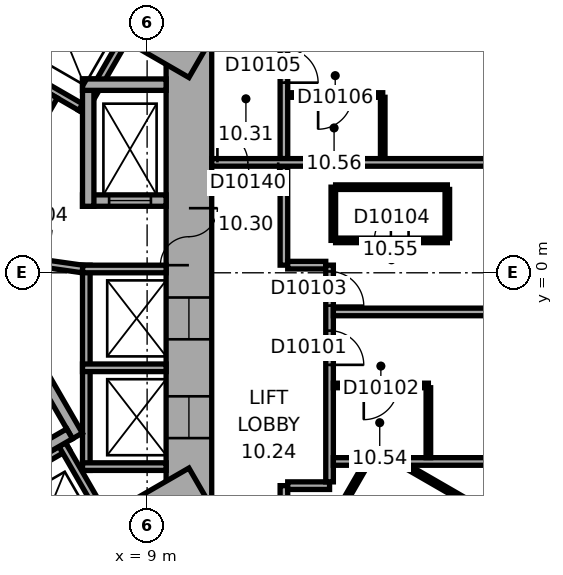
"""IFC4 building model, lengths in metres.
Left out: names, types, materials, properties, quantities, classifications, styles, units other than length and angle.
Written with IfcOpenShell. Run it as: python <this file> out.ifc"""

import sys

from ifc_helpers import new_model, si_unit, direction, frame, frame_2d, origin, place, context, subcontext, project, spatial, rectangle, extrude, element, fill, save


model = new_model("IFC4")
c1 = context("Model", 3, precision=1e-05, world=origin(), true_north=direction((0.0, 1.0)))
c2 = subcontext(c1, "Body", "Model", "MODEL_VIEW")
j1 = project(units=[si_unit("LENGTHUNIT", "METRE"), si_unit("PLANEANGLEUNIT", "RADIAN")], contexts=[c1])
p1 = place(None, origin())
s1 = spatial("IfcSite", under=j1, at=p1, CompositionType="ELEMENT")
p2 = place(p1, origin())
s2 = spatial("IfcBuilding", under=s1, at=p2, CompositionType="ELEMENT")
p3 = place(p2, frame((0.0, 0.0, 53.9)))
s3 = spatial("IfcBuildingStorey", under=s2, at=p3, CompositionType="ELEMENT", Elevation=53.9)
p4 = place(p3, frame((10.1, -6.177, 0.0), z_axis=(0.0, 0.0, 1.0), x_axis=(0.0, 1.0, 0.0)))
e1 = element("IfcWall", 1, at=p4, inside=s3, PredefinedType="SHEAR", context=c2, shape_type="SweptSolid", body=[
    extrude(rectangle(XDim=12.355, YDim=1.2, at=frame_2d((6.177, 0.0))), origin(), (0.0, 0.0, 1.0), 3.3),
])
p5 = place(p4, frame((6.378, 0.0, 0.0)))
e2 = element("IfcOpeningElement", 2, at=p5, cuts=e1, PredefinedType="OPENING", context=c2, shape_type="SweptSolid", body=[
    extrude(rectangle(XDim=1.5, YDim=2.1, at=frame_2d((0.75, 1.05))), frame((0.0, 0.61, 0.0), z_axis=(0.0, -1.0, 0.0), x_axis=(1.0, 0.0, 0.0)), (0.0, 0.0, 1.0), 1.22),
])
p6 = place(p4, frame((1.828, 0.0, 0.0)))
e3 = element("IfcOpeningElement", 3, at=p6, cuts=e1, PredefinedType="OPENING", context=c2, shape_type="SweptSolid", body=[
    extrude(rectangle(XDim=1.1, YDim=2.1, at=frame_2d((0.55, 1.05))), frame((0.0, 0.61, 0.0), z_axis=(0.0, -1.0, 0.0), x_axis=(1.0, 0.0, 0.0)), (0.0, 0.0, 1.0), 1.22),
])
p7 = place(p4, frame((4.427, 0.0, 0.0)))
e4 = element("IfcOpeningElement", 4, at=p7, cuts=e1, PredefinedType="OPENING", context=c2, shape_type="SweptSolid", body=[
    extrude(rectangle(XDim=1.1, YDim=2.1, at=frame_2d((0.55, 1.05))), frame((0.0, 0.61, 0.0), z_axis=(0.0, -1.0, 0.0), x_axis=(1.0, 0.0, 0.0)), (0.0, 0.0, 1.0), 1.22),
])
p8 = place(p3, frame((10.4, 5.658, 0.0), z_axis=(0.0, 0.0, 1.0), x_axis=(-0.866021384402, 0.500006961711, 0.0)))
e5 = element("IfcWall", 5, at=p8, inside=s3, PredefinedType="SHEAR", context=c2, shape_type="SweptSolid", body=[
    extrude(rectangle(XDim=12.355, YDim=1.2, at=frame_2d((6.178, 0.0))), origin(), (0.0, 0.0, 1.0), 3.3),
])
p9 = place(p8, frame((2.728, 0.0, 0.0)))
e6 = element("IfcOpeningElement", 6, at=p9, cuts=e5, PredefinedType="OPENING", context=c2, shape_type="SweptSolid", body=[
    extrude(rectangle(XDim=1.1, YDim=2.1, at=frame_2d((0.55, 1.05))), frame((0.0, 0.61, 0.0), z_axis=(0.0, -1.0, 0.0), x_axis=(1.0, 0.0, 0.0)), (0.0, 0.0, 1.0), 1.22),
])
p10 = place(p8, frame((5.328, 0.0, 0.0)))
e7 = element("IfcOpeningElement", 7, at=p10, cuts=e5, PredefinedType="OPENING", context=c2, shape_type="SweptSolid", body=[
    extrude(rectangle(XDim=1.1, YDim=2.1, at=frame_2d((0.55, 1.05))), frame((0.0, 0.61, 0.0), z_axis=(0.0, -1.0, 0.0), x_axis=(1.0, 0.0, 0.0)), (0.0, 0.0, 1.0), 1.22),
])
p11 = place(p8, frame((7.928, 0.0, 0.0)))
e8 = element("IfcOpeningElement", 8, at=p11, cuts=e5, PredefinedType="OPENING", context=c2, shape_type="SweptSolid", body=[
    extrude(rectangle(XDim=1.1, YDim=2.1, at=frame_2d((0.55, 1.05))), frame((0.0, 0.61, 0.0), z_axis=(0.0, -1.0, 0.0), x_axis=(1.0, 0.0, 0.0)), (0.0, 0.0, 1.0), 1.22),
])
p12 = place(p3, frame((-0.3, -11.836, 0.0), z_axis=(0.0, 0.0, 1.0), x_axis=(0.866021384402, 0.500006961711, 0.0)))
e9 = element("IfcWall", 9, at=p12, inside=s3, PredefinedType="SHEAR", context=c2, shape_type="SweptSolid", body=[
    extrude(rectangle(XDim=12.355, YDim=1.2, at=frame_2d((6.178, 0.0))), origin(), (0.0, 0.0, 1.0), 3.3),
])
p13 = place(p12, frame((4.128, 0.0, 0.0)))
e10 = element("IfcOpeningElement", 10, at=p13, cuts=e9, PredefinedType="OPENING", context=c2, shape_type="SweptSolid", body=[
    extrude(rectangle(XDim=0.9, YDim=2.1, at=frame_2d((0.45, 1.05))), frame((0.0, 0.61, 0.0), z_axis=(0.0, -1.0, 0.0), x_axis=(1.0, 0.0, 0.0)), (0.0, 0.0, 1.0), 1.22),
])
p14 = place(p12, frame((7.928, 0.0, 0.0)))
e11 = element("IfcOpeningElement", 11, at=p14, cuts=e9, PredefinedType="OPENING", context=c2, shape_type="SweptSolid", body=[
    extrude(rectangle(XDim=1.1, YDim=2.1, at=frame_2d((0.55, 1.05))), frame((0.0, 0.61, 0.0), z_axis=(0.0, -1.0, 0.0), x_axis=(1.0, 0.0, 0.0)), (0.0, 0.0, 1.0), 1.22),
])
p15 = place(p3, frame((7.4, -5.2, 0.0), z_axis=(0.0, 0.0, 1.0), x_axis=(0.0, 1.0, 0.0)))
e12 = element("IfcWall", 12, at=p15, inside=s3, PredefinedType="PARTITIONING", context=c2, shape_type="SweptSolid", body=[
    extrude(rectangle(XDim=5.4, YDim=0.2, at=frame_2d((2.7, 0.0))), origin(), (0.0, 0.0, 1.0), 3.05),
])
for number, where, z_axis, x_axis in (
    (13, (7.3, -5.1, 0.0), (0.0, 0.0, 1.0), (1.0, 0.0, 0.0)),
    (14, (7.3, -2.5, 0.0), (0.0, 0.0, 1.0), (1.0, 0.0, 0.0)),
    (15, (7.3, 0.1, 0.0), (0.0, 0.0, 1.0), (1.0, 0.0, 0.0)),
):
    element("IfcWall", number, at=place(p3, frame(where, z_axis=z_axis, x_axis=x_axis)), inside=s3, PredefinedType="PARTITIONING", context=c2, shape_type="SweptSolid", body=[
        extrude(rectangle(XDim=2.2, YDim=0.2, at=frame_2d((1.1, 0.0))), origin(), (0.0, 0.0, 1.0), 3.05),
    ])
p16 = place(p3, frame((7.424, 4.259, 0.0), z_axis=(0.0, 0.0, 1.0), x_axis=(-0.866026010844, 0.49999894854, 0.0)))
e16 = element("IfcWall", 16, at=p16, inside=s3, PredefinedType="PARTITIONING", context=c2, shape_type="SweptSolid", body=[
    extrude(rectangle(XDim=8.0, YDim=0.2, at=frame_2d((4.0, 0.0))), origin(), (0.0, 0.0, 1.0), 3.05),
])
p17 = place(p3, frame((7.287, 4.222, 0.0), z_axis=(0.0, 0.0, 1.0), x_axis=(0.499946605688, 0.86605622881, 0.0)))
e17 = element("IfcWall", 17, at=p17, inside=s3, PredefinedType="PARTITIONING", context=c2, shape_type="SweptSolid", body=[
    extrude(rectangle(XDim=2.2, YDim=0.2, at=frame_2d((1.1, 0.0))), origin(), (0.0, 0.0, 1.0), 3.05),
])
p18 = place(p3, frame((-0.024, -8.559, 0.0), z_axis=(0.0, 0.0, 1.0), x_axis=(0.866026010844, 0.49999894854, 0.0)))
e18 = element("IfcWall", 18, at=p18, inside=s3, PredefinedType="PARTITIONING", context=c2, shape_type="SweptSolid", body=[
    extrude(rectangle(XDim=8.0, YDim=0.2, at=frame_2d((4.0, 0.0))), origin(), (0.0, 0.0, 1.0), 3.05),
])
p19 = place(p3, frame((6.768, -4.522, 0.0), z_axis=(0.0, 0.0, 1.0), x_axis=(0.50002983664, -0.866008176907, 0.0)))
e19 = element("IfcWall", 19, at=p19, inside=s3, PredefinedType="PARTITIONING", context=c2, shape_type="SweptSolid", body=[
    extrude(rectangle(XDim=2.2, YDim=0.2, at=frame_2d((1.1, 0.0))), origin(), (0.0, 0.0, 1.0), 3.05),
])
p20 = place(p3, frame((4.158, 0.602, 0.0), z_axis=(0.0, 0.0, 1.0), x_axis=(0.499977259774, 0.866038532462, 0.0)))
e20 = element("IfcWall", 20, at=p20, inside=s3, PredefinedType="SHEAR", context=c2, shape_type="SweptSolid", body=[
    extrude(rectangle(XDim=4.7, YDim=0.3, at=frame_2d((2.35, 0.0))), origin(), (0.0, 0.0, 1.0), 3.05),
])
p21 = place(p20, frame((0.8, 0.0, 0.0)))
e21 = element("IfcOpeningElement", 21, at=p21, cuts=e20, PredefinedType="OPENING", context=c2, shape_type="SweptSolid", body=[
    extrude(rectangle(XDim=1.2, YDim=2.1, at=frame_2d((0.6, 1.05))), frame((0.0, 0.16, 0.0), z_axis=(0.0, -1.0, 0.0), x_axis=(1.0, 0.0, 0.0)), (0.0, 0.0, 1.0), 0.32),
])
p22 = place(p3, frame((4.816, -0.222, 0.0), z_axis=(0.0, 0.0, 1.0), x_axis=(0.499977259774, -0.866038532462, 0.0)))
e22 = element("IfcWall", 22, at=p22, inside=s3, PredefinedType="SHEAR", context=c2, shape_type="SweptSolid", body=[
    extrude(rectangle(XDim=4.7, YDim=0.3, at=frame_2d((2.35, 0.0))), origin(), (0.0, 0.0, 1.0), 3.05),
])
p23 = place(p3, frame((0.847, -7.767, 0.0), z_axis=(0.0, 0.0, 1.0), x_axis=(0.866027801685, 0.499995846692, 0.0)))
e23 = element("IfcWall", 23, at=p23, inside=s3, PredefinedType="SHEAR", context=c2, shape_type="SweptSolid", body=[
    extrude(rectangle(XDim=7.06, YDim=0.3, at=frame_2d((3.53, 0.0))), origin(), (0.0, 0.0, 1.0), 3.05),
])
p24 = place(p3, frame((7.3, 1.9, 0.0), z_axis=(0.0, 0.0, 1.0), x_axis=(1.0, 0.0, 0.0)))
e24 = element("IfcWall", 24, at=p24, inside=s3, PredefinedType="SHEAR", context=c2, shape_type="SweptSolid", body=[
    extrude(rectangle(XDim=2.2, YDim=0.3, at=frame_2d((1.1, 0.0))), origin(), (0.0, 0.0, 1.0), 3.05),
])
p25 = place(p24, frame((0.7, 0.0, 0.0)))
e25 = element("IfcOpeningElement", 25, at=p25, cuts=e24, PredefinedType="OPENING", context=c2, shape_type="SweptSolid", body=[
    extrude(rectangle(XDim=1.1, YDim=2.1, at=frame_2d((0.55, 1.05))), frame((0.0, 0.16, 0.0), z_axis=(0.0, -1.0, 0.0), x_axis=(1.0, 0.0, 0.0)), (0.0, 0.0, 1.0), 0.32),
])
p26 = place(p3, frame((7.45, 1.75, 0.0), z_axis=(0.0, 0.0, 1.0), x_axis=(0.0, 1.0, 0.0)))
e26 = element("IfcWall", 26, at=p26, inside=s3, PredefinedType="SHEAR", context=c2, shape_type="SweptSolid", body=[
    extrude(rectangle(XDim=3.35, YDim=0.3, at=frame_2d((1.675, 0.0))), origin(), (0.0, 0.0, 1.0), 3.05),
])
p27 = place(p3, frame((7.3, 4.95, 0.0), z_axis=(0.0, 0.0, 1.0), x_axis=(1.0, 0.0, 0.0)))
e27 = element("IfcWall", 27, at=p27, inside=s3, PredefinedType="SHEAR", context=c2, shape_type="SweptSolid", body=[
    extrude(rectangle(XDim=2.2, YDim=0.3, at=frame_2d((1.1, 0.0))), origin(), (0.0, 0.0, 1.0), 3.05),
])
p28 = place(p3, frame((4.327, 0.521, 0.0), z_axis=(0.0, 0.0, 1.0), x_axis=(0.990124376366, -0.14019172346, 0.0)))
e28 = element("IfcWall", 28, at=p28, inside=s3, PredefinedType="PARTITIONING", context=c2, shape_type="SweptSolid", body=[
    extrude(rectangle(XDim=3.002, YDim=0.2, at=frame_2d((1.501, 0.0))), origin(), (0.0, 0.0, 1.0), 3.05),
])
p29 = place(p28, frame((1.15, 0.0, 0.0)))
e29 = element("IfcOpeningElement", 29, at=p29, cuts=e28, PredefinedType="OPENING", context=c2, shape_type="SweptSolid", body=[
    extrude(rectangle(XDim=0.9, YDim=2.1, at=frame_2d((0.45, 1.05))), frame((0.0, 0.11, 0.0), z_axis=(0.0, -1.0, 0.0), x_axis=(1.0, 0.0, 0.0)), (0.0, 0.0, 1.0), 0.22),
])
p30 = place(p3, frame((12.6, -6.138, 0.0), z_axis=(0.0, 0.0, 1.0), x_axis=(0.0, 1.0, 0.0)))
e30 = element("IfcWall", 30, at=p30, inside=s3, PredefinedType="PARTITIONING", context=c2, shape_type="SweptSolid", body=[
    extrude(rectangle(XDim=0.537, YDim=0.2, at=frame_2d((0.268, 0.0))), origin(), (0.0, 0.0, 1.0), 3.05),
])
p31 = place(p3, frame((12.6, 0.201, 0.0), z_axis=(0.0, 0.0, 1.0), x_axis=(0.0, 1.0, 0.0)))
e31 = element("IfcWall", 31, at=p31, inside=s3, PredefinedType="PARTITIONING", context=c2, shape_type="SweptSolid", body=[
    extrude(rectangle(XDim=2.604, YDim=0.2, at=frame_2d((1.302, 0.0))), origin(), (0.0, 0.0, 1.0), 3.05),
])
p32 = place(p3, frame((12.6, 3.004, 0.0), z_axis=(0.0, 0.0, 1.0), x_axis=(0.0, 1.0, 0.0)))
e32 = element("IfcWall", 32, at=p32, inside=s3, PredefinedType="PARTITIONING", context=c2, shape_type="SweptSolid", body=[
    extrude(rectangle(XDim=3.173, YDim=0.2, at=frame_2d((1.586, 0.0))), origin(), (0.0, 0.0, 1.0), 3.05),
])
p33 = place(p32, frame((1.998, 0.0, 0.0)))
e33 = element("IfcOpeningElement", 33, at=p33, cuts=e32, PredefinedType="OPENING", context=c2, shape_type="SweptSolid", body=[
    extrude(rectangle(XDim=0.9, YDim=2.1, at=frame_2d((0.45, 1.05))), frame((0.0, 0.11, 0.0), z_axis=(0.0, -1.0, 0.0), x_axis=(1.0, 0.0, 0.0)), (0.0, 0.0, 1.0), 0.22),
])
p34 = place(p3, frame((12.7, -5.601, 0.0), z_axis=(0.0, 0.0, 1.0), x_axis=(1.0, 0.0, 0.0)))
e34 = element("IfcWall", 34, at=p34, inside=s3, PredefinedType="PARTITIONING", context=c2, shape_type="SweptSolid", body=[
    extrude(rectangle(XDim=1.101, YDim=0.2, at=frame_2d((0.551, 0.0))), origin(), (0.0, 0.0, 1.0), 3.05),
])
p35 = place(p3, frame((12.7, 4.677, 0.0), z_axis=(0.0, 0.0, 1.0), x_axis=(1.0, 0.0, 0.0)))
e35 = element("IfcWall", 35, at=p35, inside=s3, PredefinedType="PARTITIONING", context=c2, shape_type="SweptSolid", body=[
    extrude(rectangle(XDim=2.5, YDim=0.12, at=frame_2d((1.25, 0.0))), origin(), (0.0, 0.0, 1.0), 3.05),
])
p36 = place(p35, frame((0.8, 0.0, 0.0)))
e36 = element("IfcOpeningElement", 36, at=p36, cuts=e35, PredefinedType="OPENING", context=c2, shape_type="SweptSolid", body=[
    extrude(rectangle(XDim=0.9, YDim=2.1, at=frame_2d((0.45, 1.05))), frame((0.0, 0.07, 0.0), z_axis=(0.0, -1.0, 0.0), x_axis=(1.0, 0.0, 0.0)), (0.0, 0.0, 1.0), 0.14),
])
p37 = place(p3, frame((13.701, 0.201, 0.0), z_axis=(0.0, 0.0, 1.0), x_axis=(-1.0, 0.0, 0.0)))
e37 = element("IfcWall", 37, at=p37, inside=s3, PredefinedType="PARTITIONING", context=c2, shape_type="SweptSolid", body=[
    extrude(rectangle(XDim=1.001, YDim=0.2, at=frame_2d((0.5, 0.0))), origin(), (0.0, 0.0, 1.0), 3.05),
])
p38 = place(p3, frame((13.801, -5.501, 0.0), z_axis=(0.0, 0.0, 1.0), x_axis=(0.0, 1.0, 0.0)))
e38 = element("IfcWall", 38, at=p38, inside=s3, PredefinedType="PARTITIONING", context=c2, shape_type="SweptSolid", body=[
    extrude(rectangle(XDim=5.702, YDim=0.2, at=frame_2d((2.851, 0.0))), origin(), (0.0, 0.0, 1.0), 3.05),
])
p39 = place(p38, frame((3.079, 0.0, 0.0)))
e39 = element("IfcOpeningElement", 39, at=p39, cuts=e38, PredefinedType="OPENING", context=c2, shape_type="SweptSolid", body=[
    extrude(rectangle(XDim=0.9, YDim=2.1, at=frame_2d((0.45, 1.05))), frame((0.0, 0.11, 0.0), z_axis=(0.0, -1.0, 0.0), x_axis=(1.0, 0.0, 0.0)), (0.0, 0.0, 1.0), 0.22),
])
p40 = place(p38, frame((4.636, 0.0, 0.0)))
e40 = element("IfcOpeningElement", 40, at=p40, cuts=e38, PredefinedType="OPENING", context=c2, shape_type="SweptSolid", body=[
    extrude(rectangle(XDim=0.9, YDim=2.1, at=frame_2d((0.45, 1.05))), frame((0.0, 0.11, 0.0), z_axis=(0.0, -1.0, 0.0), x_axis=(1.0, 0.0, 0.0)), (0.0, 0.0, 1.0), 0.22),
])
p41 = place(p3, frame((13.901, -6.524, 0.0), z_axis=(0.0, 0.0, 1.0), x_axis=(0.499964162598, 0.86604609353, 0.0)))
e41 = element("IfcWall", 41, at=p41, inside=s3, PredefinedType="PARTITIONING", context=c2, shape_type="SweptSolid", body=[
    extrude(rectangle(XDim=1.661, YDim=0.12, at=frame_2d((0.831, 0.0))), origin(), (0.0, 0.0, 1.0), 3.05),
])
p42 = place(p3, frame((13.901, -4.965, 0.0), z_axis=(0.0, 0.0, 1.0), x_axis=(1.0, 0.0, 0.0)))
e42 = element("IfcWall", 42, at=p42, inside=s3, PredefinedType="PARTITIONING", context=c2, shape_type="SweptSolid", body=[
    extrude(rectangle(XDim=8.049, YDim=0.2, at=frame_2d((4.024, 0.0))), origin(), (0.0, 0.0, 1.0), 3.05),
])
p43 = place(p3, frame((13.901, -2.965, 0.0), z_axis=(0.0, 0.0, 1.0), x_axis=(1.0, 0.0, 0.0)))
e43 = element("IfcWall", 43, at=p43, inside=s3, PredefinedType="PARTITIONING", context=c2, shape_type="SweptSolid", body=[
    extrude(rectangle(XDim=2.5, YDim=0.12, at=frame_2d((1.25, 0.0))), origin(), (0.0, 0.0, 1.0), 3.05),
])
p44 = place(p43, frame((0.8, 0.0, 0.0)))
e44 = element("IfcOpeningElement", 44, at=p44, cuts=e43, PredefinedType="OPENING", context=c2, shape_type="SweptSolid", body=[
    extrude(rectangle(XDim=0.9, YDim=2.1, at=frame_2d((0.45, 1.05))), frame((0.0, 0.07, 0.0), z_axis=(0.0, -1.0, 0.0), x_axis=(1.0, 0.0, 0.0)), (0.0, 0.0, 1.0), 0.14),
])
p45 = place(p3, frame((13.9, 0.853, 0.0), z_axis=(0.0, 0.0, 1.0), x_axis=(0.0, 1.0, 0.0)))
e45 = element("IfcWall", 45, at=p45, inside=s3, PredefinedType="PARTITIONING", context=c2, shape_type="SweptSolid", body=[
    extrude(rectangle(XDim=1.4, YDim=0.12, at=frame_2d((0.7, 0.0))), origin(), (0.0, 0.0, 1.0), 3.05),
])
p46 = place(p3, frame((13.96, 2.253, 0.0), z_axis=(0.0, 0.0, 1.0), x_axis=(1.0, 0.0, 0.0)))
e46 = element("IfcWall", 46, at=p46, inside=s3, PredefinedType="PARTITIONING", context=c2, shape_type="SweptSolid", body=[
    extrude(rectangle(XDim=2.94, YDim=0.12, at=frame_2d((1.47, 0.0))), origin(), (0.0, 0.0, 1.0), 3.05),
])
p47 = place(p3, frame((15.2, 4.618, 0.0), z_axis=(0.0, 0.0, 1.0), x_axis=(0.0, -1.0, 0.0)))
e47 = element("IfcWall", 47, at=p47, inside=s3, PredefinedType="PARTITIONING", context=c2, shape_type="SweptSolid", body=[
    extrude(rectangle(XDim=1.613, YDim=0.12, at=frame_2d((0.807, 0.0))), origin(), (0.0, 0.0, 1.0), 3.05),
])
p48 = place(p3, frame((15.841, -5.104, 0.0), z_axis=(0.0, 0.0, 1.0), x_axis=(0.866025591402, -0.499999675036, 0.0)))
e48 = element("IfcWall", 48, at=p48, inside=s3, PredefinedType="PARTITIONING", context=c2, shape_type="SweptSolid", body=[
    extrude(rectangle(XDim=1.83, YDim=0.12, at=frame_2d((0.915, 0.0))), origin(), (0.0, 0.0, 1.0), 3.05),
])
p49 = place(p3, frame((16.401, -3.025, 0.0), z_axis=(0.0, 0.0, 1.0), x_axis=(0.0, -1.0, 0.0)))
e49 = element("IfcWall", 49, at=p49, inside=s3, PredefinedType="PARTITIONING", context=c2, shape_type="SweptSolid", body=[
    extrude(rectangle(XDim=1.84, YDim=0.12, at=frame_2d((0.92, 0.0))), origin(), (0.0, 0.0, 1.0), 3.05),
])
p50 = place(p3, frame((16.9, 0.853, 0.0), z_axis=(0.0, 0.0, 1.0), x_axis=(-1.0, 0.0, 0.0)))
e50 = element("IfcWall", 50, at=p50, inside=s3, PredefinedType="PARTITIONING", context=c2, shape_type="SweptSolid", body=[
    extrude(rectangle(XDim=2.94, YDim=0.12, at=frame_2d((1.47, 0.0))), origin(), (0.0, 0.0, 1.0), 3.05),
])
p51 = place(p50, frame((1.02, 0.0, 0.0)))
e51 = element("IfcOpeningElement", 51, at=p51, cuts=e50, PredefinedType="OPENING", context=c2, shape_type="SweptSolid", body=[
    extrude(rectangle(XDim=0.9, YDim=2.1, at=frame_2d((0.45, 1.05))), frame((0.0, 0.07, 0.0), z_axis=(0.0, -1.0, 0.0), x_axis=(1.0, 0.0, 0.0)), (0.0, 0.0, 1.0), 0.14),
])
p52 = place(p3, frame((16.9, 2.193, 0.0), z_axis=(0.0, 0.0, 1.0), x_axis=(0.0, -1.0, 0.0)))
e52 = element("IfcWall", 52, at=p52, inside=s3, PredefinedType="PARTITIONING", context=c2, shape_type="SweptSolid", body=[
    extrude(rectangle(XDim=1.28, YDim=0.12, at=frame_2d((0.64, 0.0))), origin(), (0.0, 0.0, 1.0), 3.05),
])
p53 = place(p3, frame((21.95, -1.03, 0.0), z_axis=(0.0, 0.0, 1.0), x_axis=(-1.0, 0.0, 0.0)))
e53 = element("IfcWall", 53, at=p53, inside=s3, PredefinedType="PARTITIONING", context=c2, shape_type="SweptSolid", body=[
    extrude(rectangle(XDim=8.049, YDim=0.2, at=frame_2d((4.024, 0.0))), origin(), (0.0, 0.0, 1.0), 2.6),
])
p54 = place(p3, frame((21.95, 2.905, 0.0), z_axis=(0.0, 0.0, 1.0), x_axis=(-1.0, 0.0, 0.0)))
e54 = element("IfcWall", 54, at=p54, inside=s3, PredefinedType="PARTITIONING", context=c2, shape_type="SweptSolid", body=[
    extrude(rectangle(XDim=11.25, YDim=0.2, at=frame_2d((5.625, 0.0))), origin(), (0.0, 0.0, 1.0), 3.05),
])
p55 = place(p54, frame((9.5, 0.0, 0.0)))
e55 = element("IfcOpeningElement", 55, at=p55, cuts=e54, PredefinedType="OPENING", context=c2, shape_type="SweptSolid", body=[
    extrude(rectangle(XDim=1.6, YDim=2.1, at=frame_2d((0.8, 1.05))), frame((0.0, 0.11, 0.0), z_axis=(0.0, -1.0, 0.0), x_axis=(1.0, 0.0, 0.0)), (0.0, 0.0, 1.0), 0.22),
])
p56 = place(p5, origin())
e56 = element("IfcDoor", 56, at=p56, inside=s3, OperationType="DOUBLE_DOOR_SINGLE_SWING", PredefinedType="DOOR", context=c2, shape_type="SweptSolid", body=[
    extrude(rectangle(XDim=1.5, YDim=2.1, at=frame_2d((0.75, 1.05))), frame((0.0, 0.025, 0.0), z_axis=(0.0, -1.0, 0.0), x_axis=(1.0, 0.0, 0.0)), (0.0, 0.0, 1.0), 0.05),
])
fill(e2, e56)
p57 = place(p25, origin())
e57 = element("IfcDoor", 57, at=p57, inside=s3, OperationType="DOUBLE_DOOR_SLIDING", PredefinedType="DOOR", context=c2, shape_type="SweptSolid", body=[
    extrude(rectangle(XDim=1.1, YDim=2.1, at=frame_2d((0.55, 1.05))), frame((0.0, 0.025, 0.0), z_axis=(0.0, -1.0, 0.0), x_axis=(1.0, 0.0, 0.0)), (0.0, 0.0, 1.0), 0.05),
])
fill(e25, e57)
p58 = place(p6, origin())
e58 = element("IfcDoor", 58, at=p58, inside=s3, OperationType="DOUBLE_DOOR_SLIDING", PredefinedType="DOOR", context=c2, shape_type="SweptSolid", body=[
    extrude(rectangle(XDim=1.1, YDim=2.1, at=frame_2d((0.55, 1.05))), frame((0.0, 0.025, 0.0), z_axis=(0.0, -1.0, 0.0), x_axis=(1.0, 0.0, 0.0)), (0.0, 0.0, 1.0), 0.05),
])
fill(e3, e58)
p59 = place(p7, origin())
e59 = element("IfcDoor", 59, at=p59, inside=s3, OperationType="DOUBLE_DOOR_SLIDING", PredefinedType="DOOR", context=c2, shape_type="SweptSolid", body=[
    extrude(rectangle(XDim=1.1, YDim=2.1, at=frame_2d((0.55, 1.05))), frame((0.0, 0.025, 0.0), z_axis=(0.0, -1.0, 0.0), x_axis=(1.0, 0.0, 0.0)), (0.0, 0.0, 1.0), 0.05),
])
fill(e4, e59)
p60 = place(p39, origin())
e60 = element("IfcDoor", 60, at=p60, inside=s3, OperationType="SINGLE_SWING_LEFT", PredefinedType="DOOR", context=c2, shape_type="SweptSolid", body=[
    extrude(rectangle(XDim=0.9, YDim=2.1, at=frame_2d((0.45, 1.05))), frame((0.0, 0.025, 0.0), z_axis=(0.0, -1.0, 0.0), x_axis=(1.0, 0.0, 0.0)), (0.0, 0.0, 1.0), 0.05),
])
fill(e39, e60)
p61 = place(p44, origin())
e61 = element("IfcDoor", 61, at=p61, inside=s3, OperationType="SINGLE_SWING_LEFT", PredefinedType="DOOR", context=c2, shape_type="SweptSolid", body=[
    extrude(rectangle(XDim=0.9, YDim=2.1, at=frame_2d((0.45, 1.05))), frame((0.0, 0.025, 0.0), z_axis=(0.0, -1.0, 0.0), x_axis=(1.0, 0.0, 0.0)), (0.0, 0.0, 1.0), 0.05),
])
fill(e44, e61)
p62 = place(p40, origin())
e62 = element("IfcDoor", 62, at=p62, inside=s3, OperationType="SINGLE_SWING_LEFT", PredefinedType="DOOR", context=c2, shape_type="SweptSolid", body=[
    extrude(rectangle(XDim=0.9, YDim=2.1, at=frame_2d((0.45, 1.05))), frame((0.0, 0.025, 0.0), z_axis=(0.0, -1.0, 0.0), x_axis=(1.0, 0.0, 0.0)), (0.0, 0.0, 1.0), 0.05),
])
fill(e40, e62)
p63 = place(p51, origin())
e63 = element("IfcDoor", 63, at=p63, inside=s3, OperationType="SINGLE_SWING_LEFT", PredefinedType="DOOR", context=c2, shape_type="SweptSolid", body=[
    extrude(rectangle(XDim=0.9, YDim=2.1, at=frame_2d((0.45, 1.05))), frame((0.0, 0.025, 0.0), z_axis=(0.0, -1.0, 0.0), x_axis=(1.0, 0.0, 0.0)), (0.0, 0.0, 1.0), 0.05),
])
fill(e51, e63)
p64 = place(p33, origin())
e64 = element("IfcDoor", 64, at=p64, inside=s3, OperationType="SINGLE_SWING_LEFT", PredefinedType="DOOR", context=c2, shape_type="SweptSolid", body=[
    extrude(rectangle(XDim=0.9, YDim=2.1, at=frame_2d((0.45, 1.05))), frame((0.0, 0.025, 0.0), z_axis=(0.0, -1.0, 0.0), x_axis=(1.0, 0.0, 0.0)), (0.0, 0.0, 1.0), 0.05),
])
fill(e33, e64)
p65 = place(p36, origin())
e65 = element("IfcDoor", 65, at=p65, inside=s3, OperationType="SINGLE_SWING_LEFT", PredefinedType="DOOR", context=c2, shape_type="SweptSolid", body=[
    extrude(rectangle(XDim=0.9, YDim=2.1, at=frame_2d((0.45, 1.05))), frame((0.0, 0.025, 0.0), z_axis=(0.0, -1.0, 0.0), x_axis=(1.0, 0.0, 0.0)), (0.0, 0.0, 1.0), 0.05),
])
fill(e36, e65)
p66 = place(p55, origin())
e66 = element("IfcDoor", 66, at=p66, inside=s3, OperationType="DOUBLE_DOOR_SINGLE_SWING", PredefinedType="DOOR", context=c2, shape_type="SweptSolid", body=[
    extrude(rectangle(XDim=1.6, YDim=2.1, at=frame_2d((0.8, 1.05))), frame((0.0, 0.025, 0.0), z_axis=(0.0, -1.0, 0.0), x_axis=(1.0, 0.0, 0.0)), (0.0, 0.0, 1.0), 0.05),
])
fill(e55, e66)
save(model, sys.argv[1])
